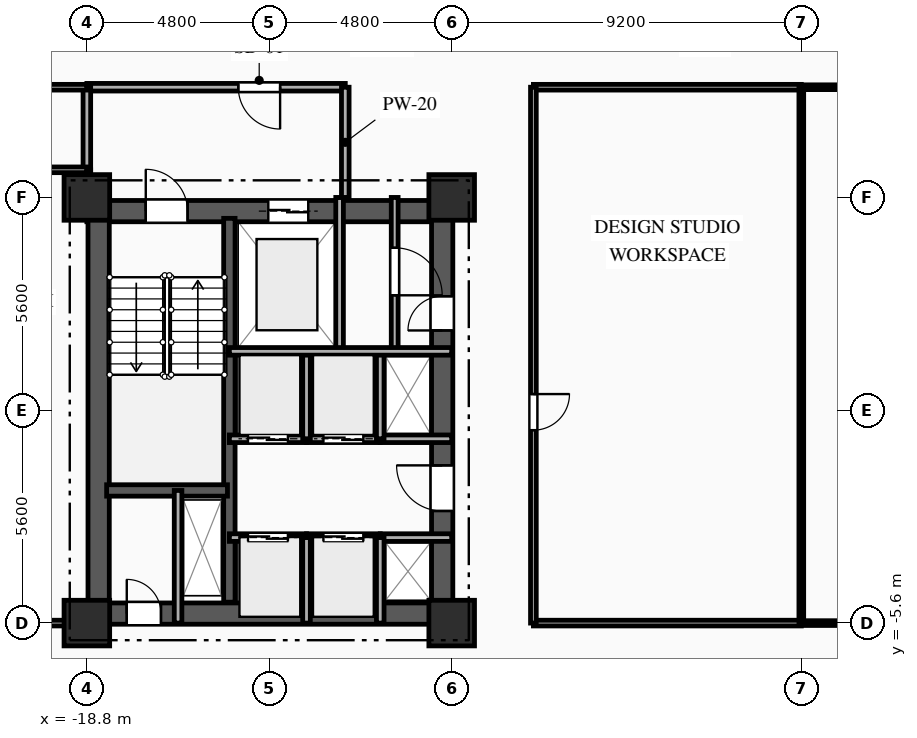
"""IFC4 building model, lengths in metres.
Left out: names, types, materials, properties, quantities, classifications, styles, units other than length and angle.
Written with IfcOpenShell. Run it as: python <this file> out.ifc"""

import sys

from ifc_helpers import new_model, si_unit, direction, frame, frame_2d, origin, origin_2d, place, context, subcontext, project, spatial, rectangle, extrude, element, fill, save


model = new_model("IFC4")
c1 = context("Model", 3, precision=1e-05, world=origin(), true_north=direction((0.0, 1.0)))
c2 = subcontext(c1, "Body", "Model", "MODEL_VIEW")
j1 = project(units=[si_unit("LENGTHUNIT", "METRE"), si_unit("PLANEANGLEUNIT", "RADIAN")], contexts=[c1])
p1 = place(None, origin())
s1 = spatial("IfcSite", under=j1, at=p1, CompositionType="ELEMENT")
p2 = place(p1, origin())
s2 = spatial("IfcBuilding", under=s1, at=p2, CompositionType="ELEMENT")
p3 = place(p2, frame((0.0, 0.0, 70.55)))
s3 = spatial("IfcBuildingStorey", under=s2, at=p3, CompositionType="ELEMENT", Elevation=70.55)
for number, where, z_axis, x_axis in (
    (1, (-18.8, -5.6, 0.0), (0.0, 0.0, 1.0), (1.0, 0.0, 0.0)),
    (2, (-18.8, 5.6, 0.0), (0.0, 0.0, 1.0), (1.0, 0.0, 0.0)),
    (3, (-9.2, -5.6, 0.0), (0.0, 0.0, 1.0), (1.0, 0.0, 0.0)),
    (4, (-9.2, 5.6, 0.0), (0.0, 0.0, 1.0), (1.0, 0.0, 0.0)),
):
    element("IfcColumn", number, at=place(p3, frame(where, z_axis=z_axis, x_axis=x_axis)), inside=s3, PredefinedType="COLUMN", context=c2, shape_type="SweptSolid", body=[
        extrude(rectangle(XDim=1.2, YDim=1.2, at=origin_2d()), origin(), (0.0, 0.0, 1.0), 3.35),
    ])
p4 = place(p3, frame((-18.8, 5.24, 0.0), z_axis=(0.0, 0.0, 1.0), x_axis=(1.0, 0.0, 0.0)))
e5 = element("IfcWall", 5, at=p4, inside=s3, PredefinedType="SHEAR", context=c2, shape_type="SweptSolid", body=[
    extrude(rectangle(XDim=9.6, YDim=0.56, at=frame_2d((4.8, 0.0))), origin(), (0.0, 0.0, 1.0), 3.0),
])
p5 = place(p4, frame((1.55, 0.0, 0.0)))
e6 = element("IfcOpeningElement", 6, at=p5, cuts=e5, PredefinedType="OPENING", context=c2, shape_type="SweptSolid", body=[
    extrude(rectangle(XDim=1.1, YDim=2.15, at=frame_2d((0.55, 1.075))), frame((0.0, 0.29, 0.0), z_axis=(0.0, -1.0, 0.0), x_axis=(1.0, 0.0, 0.0)), (0.0, 0.0, 1.0), 0.58),
])
p6 = place(p4, frame((4.775, 0.0, 0.0)))
e7 = element("IfcOpeningElement", 7, at=p6, cuts=e5, PredefinedType="OPENING", context=c2, shape_type="SweptSolid", body=[
    extrude(rectangle(XDim=1.05, YDim=2.1, at=frame_2d((0.525, 1.05))), frame((0.0, 0.29, 0.0), z_axis=(0.0, -1.0, 0.0), x_axis=(1.0, 0.0, 0.0)), (0.0, 0.0, 1.0), 0.58),
])
p7 = place(p3, frame((-18.8, -5.35, 0.0), z_axis=(0.0, 0.0, 1.0), x_axis=(1.0, 0.0, 0.0)))
e8 = element("IfcWall", 8, at=p7, inside=s3, PredefinedType="SHEAR", context=c2, shape_type="SweptSolid", body=[
    extrude(rectangle(XDim=9.6, YDim=0.56, at=frame_2d((4.8, 0.0))), origin(), (0.0, 0.0, 1.0), 3.0),
])
p8 = place(p7, frame((1.05, 0.0, 0.0)))
e9 = element("IfcOpeningElement", 9, at=p8, cuts=e8, PredefinedType="OPENING", context=c2, shape_type="SweptSolid", body=[
    extrude(rectangle(XDim=0.9, YDim=2.1, at=frame_2d((0.45, 1.05))), frame((0.0, 0.29, 0.0), z_axis=(0.0, -1.0, 0.0), x_axis=(1.0, 0.0, 0.0)), (0.0, 0.0, 1.0), 0.58),
])
p9 = place(p3, frame((-18.49, -5.05, 0.0), z_axis=(0.0, 0.0, 1.0), x_axis=(0.0, 1.0, 0.0)))
e10 = element("IfcWall", 10, at=p9, inside=s3, PredefinedType="SHEAR", context=c2, shape_type="SweptSolid", body=[
    extrude(rectangle(XDim=10.1, YDim=0.56, at=frame_2d((5.05, 0.0))), origin(), (0.0, 0.0, 1.0), 3.0),
])
p10 = place(p3, frame((-9.45, -5.05, 0.0), z_axis=(0.0, 0.0, 1.0), x_axis=(0.0, 1.0, 0.0)))
e11 = element("IfcWall", 11, at=p10, inside=s3, PredefinedType="SHEAR", context=c2, shape_type="SweptSolid", body=[
    extrude(rectangle(XDim=10.1, YDim=0.56, at=frame_2d((5.05, 0.0))), origin(), (0.0, 0.0, 1.0), 3.0),
])
p11 = place(p10, frame((7.15, 0.0, 0.0)))
e12 = element("IfcOpeningElement", 12, at=p11, cuts=e11, PredefinedType="OPENING", context=c2, shape_type="SweptSolid", body=[
    extrude(rectangle(XDim=0.9, YDim=2.1, at=frame_2d((0.45, 1.05))), frame((0.0, 0.29, 0.0), z_axis=(0.0, -1.0, 0.0), x_axis=(1.0, 0.0, 0.0)), (0.0, 0.0, 1.0), 0.58),
])
p12 = place(p10, frame((2.4, 0.0, 0.0)))
e13 = element("IfcOpeningElement", 13, at=p12, cuts=e11, PredefinedType="OPENING", context=c2, shape_type="SweptSolid", body=[
    extrude(rectangle(XDim=1.2, YDim=2.15, at=frame_2d((0.6, 1.075))), frame((0.0, 0.29, 0.0), z_axis=(0.0, -1.0, 0.0), x_axis=(1.0, 0.0, 0.0)), (0.0, 0.0, 1.0), 0.58),
])
p13 = place(p3, frame((-15.05, -5.05, 0.0), z_axis=(0.0, 0.0, 1.0), x_axis=(0.0, 1.0, 0.0)))
e14 = element("IfcWall", 14, at=p13, inside=s3, PredefinedType="SHEAR", context=c2, shape_type="SweptSolid", body=[
    extrude(rectangle(XDim=10.1, YDim=0.3, at=frame_2d((5.05, 0.0))), origin(), (0.0, 0.0, 1.0), 3.0),
])
p14 = place(p3, frame((-18.28, -2.11, 0.0), z_axis=(0.0, 0.0, 1.0), x_axis=(1.0, 0.0, 0.0)))
e15 = element("IfcWall", 15, at=p14, inside=s3, PredefinedType="SHEAR", context=c2, shape_type="SweptSolid", body=[
    extrude(rectangle(XDim=3.18, YDim=0.3, at=frame_2d((1.59, 0.0))), origin(), (0.0, 0.0, 1.0), 3.0),
])
p15 = place(p3, frame((-16.4, -5.6, 0.0), z_axis=(0.0, 0.0, 1.0), x_axis=(0.0, 1.0, 0.0)))
e16 = element("IfcWall", 16, at=p15, inside=s3, PredefinedType="PARTITIONING", context=c2, shape_type="SweptSolid", body=[
    extrude(rectangle(XDim=3.49, YDim=0.2, at=frame_2d((1.745, 0.0))), origin(), (0.0, 0.0, 1.0), 3.0),
])
p16 = place(p3, frame((-12.15, 1.55, 0.0), z_axis=(0.0, 0.0, 1.0), x_axis=(0.0, 1.0, 0.0)))
e17 = element("IfcWall", 17, at=p16, inside=s3, PredefinedType="PARTITIONING", context=c2, shape_type="SweptSolid", body=[
    extrude(rectangle(XDim=4.05, YDim=0.2, at=frame_2d((2.025, 0.0))), origin(), (0.0, 0.0, 1.0), 3.0),
])
p17 = place(p3, frame((-12.0, 8.5, 0.0), z_axis=(0.0, 0.0, 1.0), x_axis=(-1.0, 0.0, 0.0)))
e18 = element("IfcWall", 18, at=p17, inside=s3, PredefinedType="PARTITIONING", context=c2, shape_type="SweptSolid", body=[
    extrude(rectangle(XDim=6.8, YDim=0.2, at=frame_2d((3.4, 0.0))), origin(), (0.0, 0.0, 1.0), 3.0),
])
p18 = place(p17, frame((1.715, 0.0, 0.0)))
e19 = element("IfcOpeningElement", 19, at=p18, cuts=e18, PredefinedType="OPENING", context=c2, shape_type="SweptSolid", body=[
    extrude(rectangle(XDim=1.1, YDim=2.15, at=frame_2d((0.55, 1.075))), frame((0.0, 0.11, 0.0), z_axis=(0.0, -1.0, 0.0), x_axis=(1.0, 0.0, 0.0)), (0.0, 0.0, 1.0), 0.22),
])
p19 = place(p3, frame((-12.0, 5.6, 0.0), z_axis=(0.0, 0.0, 1.0), x_axis=(0.0, 1.0, 0.0)))
e20 = element("IfcWall", 20, at=p19, inside=s3, PredefinedType="PARTITIONING", context=c2, shape_type="SweptSolid", body=[
    extrude(rectangle(XDim=2.9, YDim=0.2, at=frame_2d((1.45, 0.0))), origin(), (0.0, 0.0, 1.0), 3.0),
])
p20 = place(p3, frame((-18.8, 6.327, 0.0), z_axis=(0.0, 0.0, 1.0), x_axis=(0.0, -1.0, 0.0)))
e21 = element("IfcWall", 21, at=p20, inside=s3, PredefinedType="PARTITIONING", context=c2, shape_type="SweptSolid", body=[
    extrude(rectangle(XDim=0.727, YDim=0.2, at=frame_2d((0.363, 0.0))), origin(), (0.0, 0.0, 1.0), 2.485),
])
p21 = place(p3, frame((-18.8, 8.5, 0.0), z_axis=(0.0, 0.0, 1.0), x_axis=(0.0, -1.0, 0.0)))
e22 = element("IfcWall", 22, at=p21, inside=s3, PredefinedType="PARTITIONING", context=c2, shape_type="SweptSolid", body=[
    extrude(rectangle(XDim=2.173, YDim=0.2, at=frame_2d((1.086, 0.0))), origin(), (0.0, 0.0, 1.0), 2.485),
])
p22 = place(p3, frame((-10.7, 5.6, 0.0), z_axis=(0.0, 0.0, 1.0), x_axis=(0.0, -1.0, 0.0)))
e23 = element("IfcWall", 23, at=p22, inside=s3, PredefinedType="PARTITIONING", context=c2, shape_type="SweptSolid", body=[
    extrude(rectangle(XDim=4.05, YDim=0.18, at=frame_2d((2.025, 0.0))), origin(), (0.0, 0.0, 1.0), 3.0),
])
p23 = place(p22, frame((1.325, 0.0, 0.0)))
e24 = element("IfcOpeningElement", 24, at=p23, cuts=e23, PredefinedType="OPENING", context=c2, shape_type="SweptSolid", body=[
    extrude(rectangle(XDim=1.25, YDim=2.2, at=frame_2d((0.625, 1.1))), frame((0.0, 0.1, 0.0), z_axis=(0.0, -1.0, 0.0), x_axis=(1.0, 0.0, 0.0)), (0.0, 0.0, 1.0), 0.2),
])
p24 = place(p3, frame((-15.05, -3.35, 0.0), z_axis=(0.0, 0.0, 1.0), x_axis=(1.0, 0.0, 0.0)))
e25 = element("IfcWall", 25, at=p24, inside=s3, PredefinedType="PARTITIONING", context=c2, shape_type="SweptSolid", body=[
    extrude(rectangle(XDim=2.03, YDim=0.2, at=frame_2d((1.015, 0.0))), origin(), (0.0, 0.0, 1.0), 3.0),
])
p25 = place(p24, frame((0.49, 0.0, 0.0)))
e26 = element("IfcOpeningElement", 26, at=p25, cuts=e25, PredefinedType="OPENING", context=c2, shape_type="SweptSolid", body=[
    extrude(rectangle(XDim=1.05, YDim=2.1, at=frame_2d((0.525, 1.05))), frame((0.0, 0.11, 0.0), z_axis=(0.0, -1.0, 0.0), x_axis=(1.0, 0.0, 0.0)), (0.0, 0.0, 1.0), 0.22),
])
p26 = place(p3, frame((-13.02, -3.35, 0.0), z_axis=(0.0, 0.0, 1.0), x_axis=(1.0, 0.0, 0.0)))
e27 = element("IfcWall", 27, at=p26, inside=s3, PredefinedType="PARTITIONING", context=c2, shape_type="SweptSolid", body=[
    extrude(rectangle(XDim=1.94, YDim=0.2, at=frame_2d((0.97, 0.0))), origin(), (0.0, 0.0, 1.0), 3.0),
])
p27 = place(p26, frame((0.445, 0.0, 0.0)))
e28 = element("IfcOpeningElement", 28, at=p27, cuts=e27, PredefinedType="OPENING", context=c2, shape_type="SweptSolid", body=[
    extrude(rectangle(XDim=1.05, YDim=2.1, at=frame_2d((0.525, 1.05))), frame((0.0, 0.11, 0.0), z_axis=(0.0, -1.0, 0.0), x_axis=(1.0, 0.0, 0.0)), (0.0, 0.0, 1.0), 0.22),
])
p28 = place(p3, frame((-11.08, -3.35, 0.0), z_axis=(0.0, 0.0, 1.0), x_axis=(1.0, 0.0, 0.0)))
e29 = element("IfcWall", 29, at=p28, inside=s3, PredefinedType="PARTITIONING", context=c2, shape_type="SweptSolid", body=[
    extrude(rectangle(XDim=1.88, YDim=0.2, at=frame_2d((0.94, 0.0))), origin(), (0.0, 0.0, 1.0), 2.715),
])
p29 = place(p3, frame((-13.02, -0.75, 0.0), z_axis=(0.0, 0.0, 1.0), x_axis=(-1.0, 0.0, 0.0)))
e30 = element("IfcWall", 30, at=p29, inside=s3, PredefinedType="PARTITIONING", context=c2, shape_type="SweptSolid", body=[
    extrude(rectangle(XDim=2.03, YDim=0.2, at=frame_2d((1.015, 0.0))), origin(), (0.0, 0.0, 1.0), 3.0),
])
p30 = place(p29, frame((0.49, 0.0, 0.0)))
e31 = element("IfcOpeningElement", 31, at=p30, cuts=e30, PredefinedType="OPENING", context=c2, shape_type="SweptSolid", body=[
    extrude(rectangle(XDim=1.05, YDim=2.1, at=frame_2d((0.525, 1.05))), frame((0.0, 0.11, 0.0), z_axis=(0.0, -1.0, 0.0), x_axis=(1.0, 0.0, 0.0)), (0.0, 0.0, 1.0), 0.22),
])
p31 = place(p3, frame((-11.08, -0.75, 0.0), z_axis=(0.0, 0.0, 1.0), x_axis=(-1.0, 0.0, 0.0)))
e32 = element("IfcWall", 32, at=p31, inside=s3, PredefinedType="PARTITIONING", context=c2, shape_type="SweptSolid", body=[
    extrude(rectangle(XDim=1.94, YDim=0.2, at=frame_2d((0.97, 0.0))), origin(), (0.0, 0.0, 1.0), 3.0),
])
p32 = place(p31, frame((0.445, 0.0, 0.0)))
e33 = element("IfcOpeningElement", 33, at=p32, cuts=e32, PredefinedType="OPENING", context=c2, shape_type="SweptSolid", body=[
    extrude(rectangle(XDim=1.05, YDim=2.1, at=frame_2d((0.525, 1.05))), frame((0.0, 0.11, 0.0), z_axis=(0.0, -1.0, 0.0), x_axis=(1.0, 0.0, 0.0)), (0.0, 0.0, 1.0), 0.22),
])
p33 = place(p3, frame((-9.2, -0.75, 0.0), z_axis=(0.0, 0.0, 1.0), x_axis=(-1.0, 0.0, 0.0)))
e34 = element("IfcWall", 34, at=p33, inside=s3, PredefinedType="PARTITIONING", context=c2, shape_type="SweptSolid", body=[
    extrude(rectangle(XDim=1.88, YDim=0.2, at=frame_2d((0.94, 0.0))), origin(), (0.0, 0.0, 1.0), 3.0),
])
for number, where, z_axis, x_axis in (
    (35, (-13.02, -5.6, 0.0), (0.0, 0.0, 1.0), (0.0, 1.0, 0.0)),
    (36, (-11.08, -5.6, 0.0), (0.0, 0.0, 1.0), (0.0, 1.0, 0.0)),
):
    element("IfcWall", number, at=place(p3, frame(where, z_axis=z_axis, x_axis=x_axis)), inside=s3, PredefinedType="PARTITIONING", context=c2, shape_type="SweptSolid", body=[
        extrude(rectangle(XDim=2.25, YDim=0.2, at=frame_2d((1.125, 0.0))), origin(), (0.0, 0.0, 1.0), 3.0),
    ])
for number, where, z_axis, x_axis in (
    (37, (-13.02, -0.75, 0.0), (0.0, 0.0, 1.0), (0.0, 1.0, 0.0)),
    (38, (-11.08, -0.75, 0.0), (0.0, 0.0, 1.0), (0.0, 1.0, 0.0)),
):
    element("IfcWall", number, at=place(p3, frame(where, z_axis=z_axis, x_axis=x_axis)), inside=s3, PredefinedType="PARTITIONING", context=c2, shape_type="SweptSolid", body=[
        extrude(rectangle(XDim=2.3, YDim=0.2, at=frame_2d((1.15, 0.0))), origin(), (0.0, 0.0, 1.0), 3.0),
    ])
p34 = place(p3, frame((-18.8, 8.5, 0.0), z_axis=(0.0, 0.0, 1.0), x_axis=(-1.0, 0.0, 0.0)))
e39 = element("IfcWall", 39, at=p34, inside=s3, PredefinedType="PARTITIONING", context=c2, shape_type="SweptSolid", body=[
    extrude(rectangle(XDim=4.2, YDim=0.15, at=frame_2d((2.1, 0.0))), origin(), (0.0, 0.0, 1.0), 3.0),
])
p35 = place(p34, frame((2.321, 0.0, 0.0)))
e40 = element("IfcOpeningElement", 40, at=p35, cuts=e39, PredefinedType="OPENING", context=c2, shape_type="SweptSolid", body=[
    extrude(rectangle(XDim=1.05, YDim=2.15, at=frame_2d((0.525, 1.075))), frame((0.0, 0.085, 0.0), z_axis=(0.0, -1.0, 0.0), x_axis=(1.0, 0.0, 0.0)), (0.0, 0.0, 1.0), 0.17),
])
p36 = place(p3, frame((0.0, 8.5, 0.0), z_axis=(0.0, 0.0, 1.0), x_axis=(-1.0, 0.0, 0.0)))
e41 = element("IfcWall", 41, at=p36, inside=s3, PredefinedType="PARTITIONING", context=c2, shape_type="SweptSolid", body=[
    extrude(rectangle(XDim=7.05, YDim=0.15, at=frame_2d((3.525, 0.0))), origin(), (0.0, 0.0, 1.0), 3.0),
])
p37 = place(p3, frame((7.05, 8.5, 0.0), z_axis=(0.0, 0.0, 1.0), x_axis=(-1.0, 0.0, 0.0)))
e42 = element("IfcWall", 42, at=p37, inside=s3, PredefinedType="PARTITIONING", context=c2, shape_type="SweptSolid", body=[
    extrude(rectangle(XDim=7.05, YDim=0.125, at=frame_2d((3.525, 0.0))), origin(), (0.0, 0.0, 1.0), 3.0),
])
p38 = place(p3, frame((-23.0, -5.6, 0.0), z_axis=(0.0, 0.0, 1.0), x_axis=(1.0, 0.0, 0.0)))
e43 = element("IfcWall", 43, at=p38, inside=s3, PredefinedType="PARTITIONING", context=c2, shape_type="SweptSolid", body=[
    extrude(rectangle(XDim=4.2, YDim=0.15, at=frame_2d((2.1, 0.0))), origin(), (0.0, 0.0, 1.0), 3.0),
])
p39 = place(p38, frame((0.829, 0.0, 0.0)))
e44 = element("IfcOpeningElement", 44, at=p39, cuts=e43, PredefinedType="OPENING", context=c2, shape_type="SweptSolid", body=[
    extrude(rectangle(XDim=1.05, YDim=2.15, at=frame_2d((0.525, 1.075))), frame((0.0, 0.085, 0.0), z_axis=(0.0, -1.0, 0.0), x_axis=(1.0, 0.0, 0.0)), (0.0, 0.0, 1.0), 0.17),
])
p40 = place(p3, frame((-7.05, -5.6, 0.0), z_axis=(0.0, 0.0, 1.0), x_axis=(1.0, 0.0, 0.0)))
e45 = element("IfcWall", 45, at=p40, inside=s3, PredefinedType="PARTITIONING", context=c2, shape_type="SweptSolid", body=[
    extrude(rectangle(XDim=7.05, YDim=0.15, at=frame_2d((3.525, 0.0))), origin(), (0.0, 0.0, 1.0), 2.485),
])
p41 = place(p3, frame((0.0, -5.6, 0.0), z_axis=(0.0, 0.0, 1.0), x_axis=(1.0, 0.0, 0.0)))
e46 = element("IfcWall", 46, at=p41, inside=s3, PredefinedType="PARTITIONING", context=c2, shape_type="SweptSolid", body=[
    extrude(rectangle(XDim=7.05, YDim=0.125, at=frame_2d((3.525, 0.0))), origin(), (0.0, 0.0, 1.0), 2.485),
])
p42 = place(p3, frame((-7.05, 8.5, 0.0), z_axis=(0.0, 0.0, 1.0), x_axis=(0.0, -1.0, 0.0)))
e47 = element("IfcWall", 47, at=p42, inside=s3, PredefinedType="PARTITIONING", context=c2, shape_type="SweptSolid", body=[
    extrude(rectangle(XDim=14.1, YDim=0.15, at=frame_2d((7.05, 0.0))), origin(), (0.0, 0.0, 1.0), 3.0),
])
p43 = place(p42, frame((8.074, 0.0, 0.0)))
e48 = element("IfcOpeningElement", 48, at=p43, cuts=e47, PredefinedType="OPENING", context=c2, shape_type="SweptSolid", body=[
    extrude(rectangle(XDim=0.95, YDim=2.1, at=frame_2d((0.475, 1.05))), frame((0.0, 0.085, 0.0), z_axis=(0.0, -1.0, 0.0), x_axis=(1.0, 0.0, 0.0)), (0.0, 0.0, 1.0), 0.17),
])
p44 = place(p3, frame((-25.59, 6.327, 0.0), z_axis=(0.0, 0.0, 1.0), x_axis=(1.0, 0.0, 0.0)))
e49 = element("IfcWall", 49, at=p44, inside=s3, PredefinedType="PARTITIONING", context=c2, shape_type="SweptSolid", body=[
    extrude(rectangle(XDim=6.79, YDim=0.15, at=frame_2d((3.395, 0.0))), origin(), (0.0, 0.0, 1.0), 3.0),
])
p45 = place(p3, frame((0.0, 8.5, 0.0), z_axis=(0.0, 0.0, 1.0), x_axis=(0.0, -1.0, 0.0)))
e50 = element("IfcWall", 50, at=p45, inside=s3, PredefinedType="PARTITIONING", context=c2, shape_type="SweptSolid", body=[
    extrude(rectangle(XDim=14.1, YDim=0.125, at=frame_2d((7.05, 0.0))), origin(), (0.0, 0.0, 1.0), 3.0),
])
p46 = place(p3, frame((-15.05, 1.55, 0.0), z_axis=(0.0, 0.0, 1.0), x_axis=(1.0, 0.0, 0.0)))
e51 = element("IfcWall", 51, at=p46, inside=s3, PredefinedType="PARTITIONING", context=c2, shape_type="SweptSolid", body=[
    extrude(rectangle(XDim=5.85, YDim=0.2, at=frame_2d((2.925, 0.0))), origin(), (0.0, 0.0, 1.0), 3.0),
])
p47 = place(p5, origin())
e52 = element("IfcDoor", 52, at=p47, inside=s3, OperationType="SINGLE_SWING_LEFT", PredefinedType="DOOR", context=c2, shape_type="SweptSolid", body=[
    extrude(rectangle(XDim=1.1, YDim=2.15, at=frame_2d((0.55, 1.075))), frame((0.0, 0.025, 0.0), z_axis=(0.0, -1.0, 0.0), x_axis=(1.0, 0.0, 0.0)), (0.0, 0.0, 1.0), 0.05),
])
fill(e6, e52)
p48 = place(p6, origin())
e53 = element("IfcDoor", 53, at=p48, inside=s3, OperationType="DOUBLE_DOOR_SLIDING", PredefinedType="DOOR", context=c2, shape_type="SweptSolid", body=[
    extrude(rectangle(XDim=1.05, YDim=2.1, at=frame_2d((0.525, 1.05))), frame((0.0, 0.025, 0.0), z_axis=(0.0, -1.0, 0.0), x_axis=(1.0, 0.0, 0.0)), (0.0, 0.0, 1.0), 0.05),
])
fill(e7, e53)
p49 = place(p8, origin())
e54 = element("IfcDoor", 54, at=p49, inside=s3, OperationType="SINGLE_SWING_LEFT", PredefinedType="DOOR", context=c2, shape_type="SweptSolid", body=[
    extrude(rectangle(XDim=0.9, YDim=2.1, at=frame_2d((0.45, 1.05))), frame((0.0, 0.025, 0.0), z_axis=(0.0, -1.0, 0.0), x_axis=(1.0, 0.0, 0.0)), (0.0, 0.0, 1.0), 0.05),
])
fill(e9, e54)
p50 = place(p18, origin())
e55 = element("IfcDoor", 55, at=p50, inside=s3, OperationType="SINGLE_SWING_LEFT", PredefinedType="DOOR", context=c2, shape_type="SweptSolid", body=[
    extrude(rectangle(XDim=1.1, YDim=2.15, at=frame_2d((0.55, 1.075))), frame((0.0, 0.025, 0.0), z_axis=(0.0, -1.0, 0.0), x_axis=(1.0, 0.0, 0.0)), (0.0, 0.0, 1.0), 0.05),
])
fill(e19, e55)
p51 = place(p23, origin())
e56 = element("IfcDoor", 56, at=p51, inside=s3, OperationType="SINGLE_SWING_RIGHT", PredefinedType="DOOR", context=c2, shape_type="SweptSolid", body=[
    extrude(rectangle(XDim=1.25, YDim=2.2, at=frame_2d((0.625, 1.1))), frame((0.0, 0.025, 0.0), z_axis=(0.0, -1.0, 0.0), x_axis=(1.0, 0.0, 0.0)), (0.0, 0.0, 1.0), 0.05),
])
fill(e24, e56)
p52 = place(p11, origin())
e57 = element("IfcDoor", 57, at=p52, inside=s3, OperationType="SINGLE_SWING_LEFT", PredefinedType="DOOR", context=c2, shape_type="SweptSolid", body=[
    extrude(rectangle(XDim=0.9, YDim=2.1, at=frame_2d((0.45, 1.05))), frame((0.0, 0.025, 0.0), z_axis=(0.0, -1.0, 0.0), x_axis=(1.0, 0.0, 0.0)), (0.0, 0.0, 1.0), 0.05),
])
fill(e12, e57)
p53 = place(p25, origin())
e58 = element("IfcDoor", 58, at=p53, inside=s3, OperationType="DOUBLE_DOOR_SLIDING", PredefinedType="DOOR", context=c2, shape_type="SweptSolid", body=[
    extrude(rectangle(XDim=1.05, YDim=2.1, at=frame_2d((0.525, 1.05))), frame((0.0, 0.025, 0.0), z_axis=(0.0, -1.0, 0.0), x_axis=(1.0, 0.0, 0.0)), (0.0, 0.0, 1.0), 0.05),
])
fill(e26, e58)
p54 = place(p27, origin())
e59 = element("IfcDoor", 59, at=p54, inside=s3, OperationType="DOUBLE_DOOR_SLIDING", PredefinedType="DOOR", context=c2, shape_type="SweptSolid", body=[
    extrude(rectangle(XDim=1.05, YDim=2.1, at=frame_2d((0.525, 1.05))), frame((0.0, 0.025, 0.0), z_axis=(0.0, -1.0, 0.0), x_axis=(1.0, 0.0, 0.0)), (0.0, 0.0, 1.0), 0.05),
])
fill(e28, e59)
p55 = place(p30, origin())
e60 = element("IfcDoor", 60, at=p55, inside=s3, OperationType="DOUBLE_DOOR_SLIDING", PredefinedType="DOOR", context=c2, shape_type="SweptSolid", body=[
    extrude(rectangle(XDim=1.05, YDim=2.1, at=frame_2d((0.525, 1.05))), frame((0.0, 0.025, 0.0), z_axis=(0.0, -1.0, 0.0), x_axis=(1.0, 0.0, 0.0)), (0.0, 0.0, 1.0), 0.05),
])
fill(e31, e60)
p56 = place(p32, origin())
e61 = element("IfcDoor", 61, at=p56, inside=s3, OperationType="DOUBLE_DOOR_SLIDING", PredefinedType="DOOR", context=c2, shape_type="SweptSolid", body=[
    extrude(rectangle(XDim=1.05, YDim=2.1, at=frame_2d((0.525, 1.05))), frame((0.0, 0.025, 0.0), z_axis=(0.0, -1.0, 0.0), x_axis=(1.0, 0.0, 0.0)), (0.0, 0.0, 1.0), 0.05),
])
fill(e33, e61)
p57 = place(p12, origin())
e62 = element("IfcDoor", 62, at=p57, inside=s3, OperationType="SINGLE_SWING_RIGHT", PredefinedType="DOOR", context=c2, shape_type="SweptSolid", body=[
    extrude(rectangle(XDim=1.2, YDim=2.15, at=frame_2d((0.6, 1.075))), frame((0.0, 0.025, 0.0), z_axis=(0.0, -1.0, 0.0), x_axis=(1.0, 0.0, 0.0)), (0.0, 0.0, 1.0), 0.05),
])
fill(e13, e62)
p58 = place(p43, origin())
e63 = element("IfcDoor", 63, at=p58, inside=s3, OperationType="SINGLE_SWING_LEFT", PredefinedType="DOOR", context=c2, shape_type="SweptSolid", body=[
    extrude(rectangle(XDim=0.95, YDim=2.1, at=frame_2d((0.475, 1.05))), frame((0.0, 0.025, 0.0), z_axis=(0.0, -1.0, 0.0), x_axis=(1.0, 0.0, 0.0)), (0.0, 0.0, 1.0), 0.05),
])
fill(e48, e63)
save(model, sys.argv[1])
